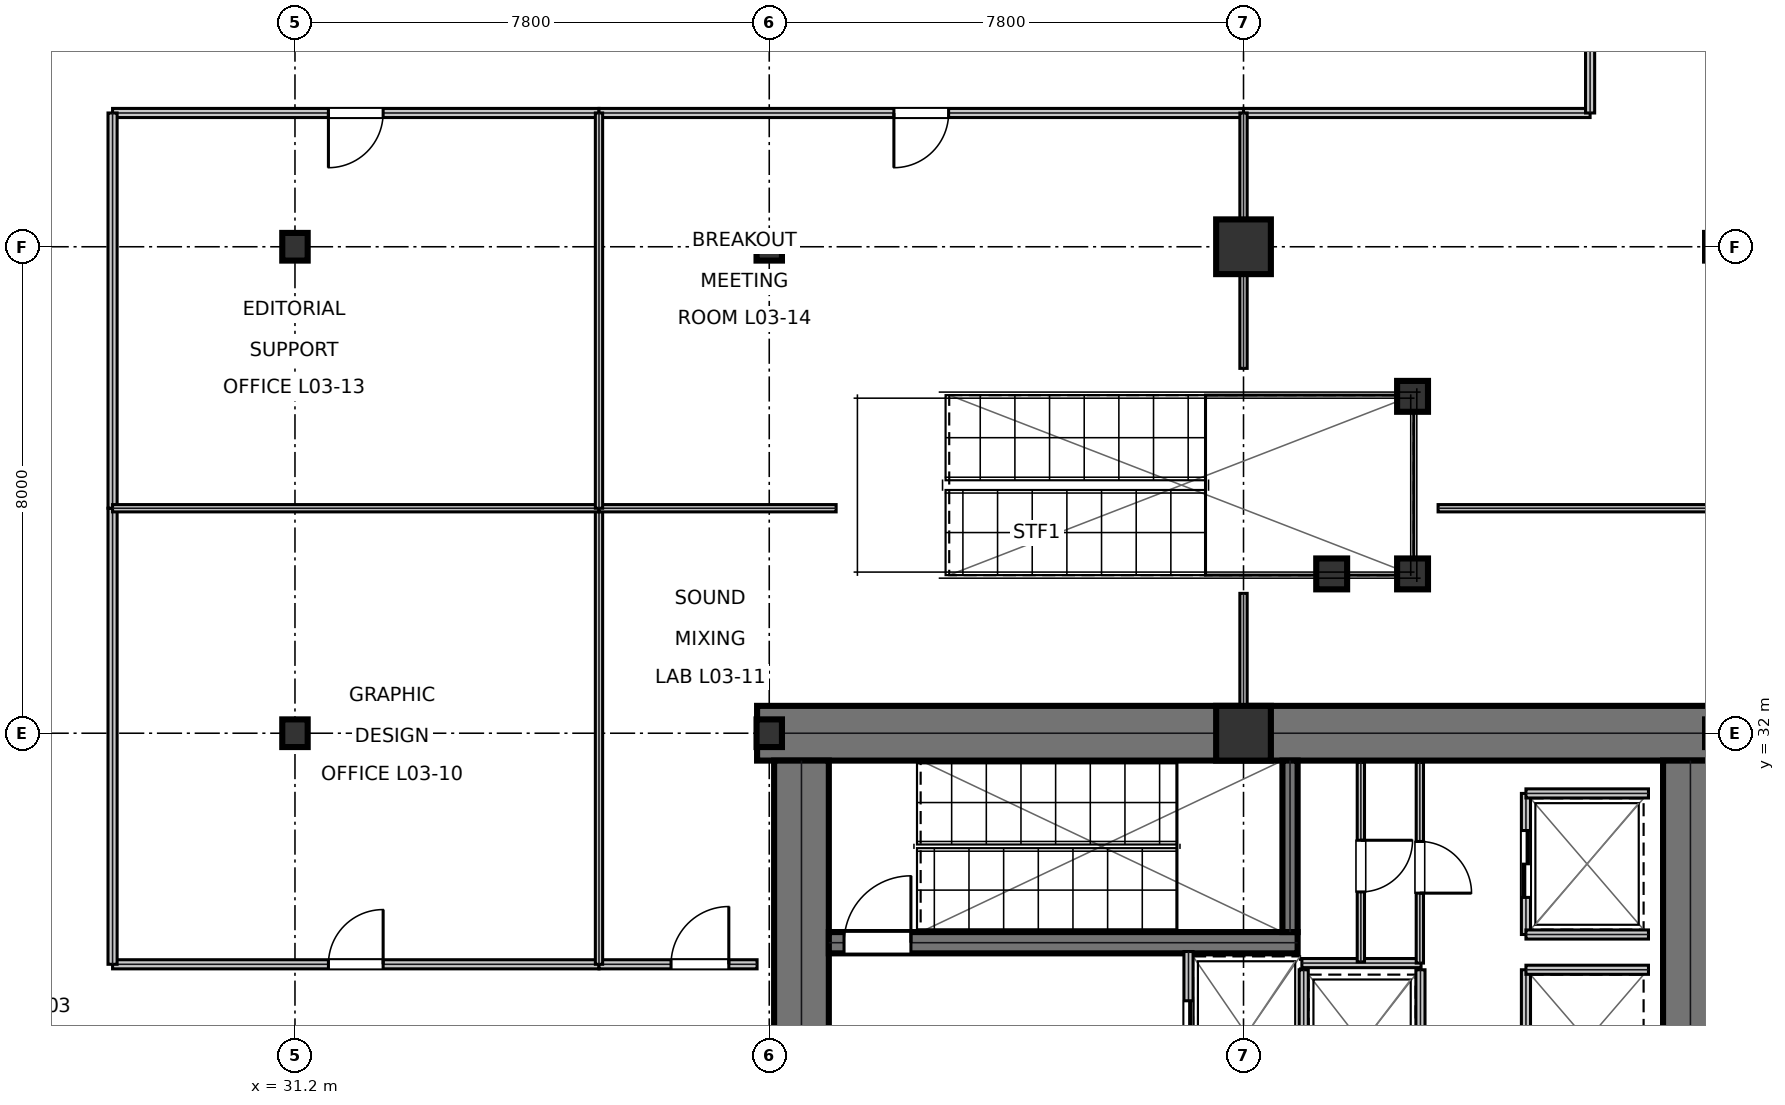
"""IFC4 building model, lengths in metres.
Left out: names, types, materials, properties, quantities, classifications, styles, units other than length and angle.
Written with IfcOpenShell. Run it as: python <this file> out.ifc"""

import sys

from ifc_helpers import new_model, si_unit, direction, frame, frame_2d, origin, origin_2d, place, context, subcontext, project, spatial, rectangle, hollow_circle, i_section, extrude, element, fill, save


model = new_model("IFC4")
c1 = context("Model", 3, precision=1e-05, world=origin(), true_north=direction((0.0, 1.0)))
c2 = subcontext(c1, "Body", "Model", "MODEL_VIEW")
j1 = project(units=[si_unit("LENGTHUNIT", "METRE"), si_unit("PLANEANGLEUNIT", "RADIAN")], contexts=[c1])
p1 = place(None, origin())
s1 = spatial("IfcSite", under=j1, at=p1, CompositionType="ELEMENT")
p2 = place(p1, origin())
s2 = spatial("IfcBuilding", under=s1, at=p2, CompositionType="ELEMENT")
p3 = place(p2, frame((0.0, 0.0, 16.2)))
s3 = spatial("IfcBuildingStorey", under=s2, at=p3, CompositionType="ELEMENT", Elevation=16.2)
p4 = place(p3, frame((38.8, 32.0, 0.0), z_axis=(0.0, 0.0, 1.0), x_axis=(1.0, 0.0, 0.0)))
e1 = element("IfcWall", 1, at=p4, inside=s3, PredefinedType="SHEAR", context=c2, shape_type="SweptSolid", body=[
    extrude(rectangle(XDim=16.0, YDim=0.9, at=frame_2d((8.0, 0.0))), origin(), (0.0, 0.0, 1.0), 5.12),
])
p5 = place(p3, frame((39.53, 25.4, 0.0), z_axis=(0.0, 0.0, 1.0), x_axis=(0.0, 1.0, 0.0)))
e2 = element("IfcWall", 2, at=p5, inside=s3, PredefinedType="SHEAR", context=c2, shape_type="SweptSolid", body=[
    extrude(rectangle(XDim=6.15, YDim=0.9, at=frame_2d((3.075, 0.0))), origin(), (0.0, 0.0, 1.0), 5.12),
])
p6 = place(p3, frame((54.15, 16.45, 0.0), z_axis=(0.0, 0.0, 1.0), x_axis=(0.0, 1.0, 0.0)))
e3 = element("IfcWall", 3, at=p6, inside=s3, PredefinedType="SHEAR", context=c2, shape_type="SweptSolid", body=[
    extrude(rectangle(XDim=15.1, YDim=0.9, at=frame_2d((7.55, 0.0))), origin(), (0.0, 0.0, 1.0), 5.12),
])
p7 = place(p3, frame((39.98, 28.555, 0.0), z_axis=(0.0, 0.0, 1.0), x_axis=(1.0, 0.0, 0.0)))
e4 = element("IfcWall", 4, at=p7, inside=s3, PredefinedType="SHEAR", context=c2, shape_type="SweptSolid", body=[
    extrude(rectangle(XDim=7.71, YDim=0.35, at=frame_2d((3.855, 0.0))), origin(), (0.0, 0.0, 1.0), 5.12),
])
p8 = place(p7, frame((0.25, 0.0, 0.0)))
e5 = element("IfcOpeningElement", 5, at=p8, cuts=e4, PredefinedType="OPENING", context=c2, shape_type="SweptSolid", body=[
    extrude(rectangle(XDim=1.1, YDim=2.15, at=frame_2d((0.55, 1.075))), frame((0.0, 0.185, 0.0), z_axis=(0.0, -1.0, 0.0), x_axis=(1.0, 0.0, 0.0)), (0.0, 0.0, 1.0), 0.37),
])
p9 = place(p3, frame((47.565, 28.73, 0.0), z_axis=(0.0, 0.0, 1.0), x_axis=(0.0, 1.0, 0.0)))
e6 = element("IfcWall", 6, at=p9, inside=s3, PredefinedType="SHEAR", context=c2, shape_type="SweptSolid", body=[
    extrude(rectangle(XDim=2.82, YDim=0.25, at=frame_2d((1.41, 0.0))), origin(), (0.0, 0.0, 1.0), 5.12),
])
for number, where, z_axis, x_axis in (
    (7, (31.2, 32.0, 0.0), (0.0, 0.0, 1.0), (1.0, 0.0, 0.0)),
    (8, (31.2, 40.0, 0.0), (0.0, 0.0, 1.0), (1.0, 0.0, 0.0)),
    (9, (39.0, 32.0, 0.0), (0.0, 0.0, 1.0), (1.0, 0.0, 0.0)),
    (10, (39.0, 40.0, 0.0), (0.0, 0.0, 1.0), (1.0, 0.0, 0.0)),
):
    element("IfcColumn", number, at=place(p3, frame(where, z_axis=z_axis, x_axis=x_axis)), inside=s3, PredefinedType="COLUMN", context=c2, shape_type="SweptSolid", body=[
        extrude(i_section(OverallWidth=0.418, OverallDepth=0.455, WebThickness=0.042, FlangeThickness=0.068, at=origin_2d()), origin(), (0.0, 0.0, 1.0), 5.395),
    ])
for number, where, z_axis, x_axis in (
    (11, (46.8, 32.0, 0.0), (0.0, 0.0, 1.0), (1.0, 0.0, 0.0)),
    (12, (46.8, 40.0, 0.0), (0.0, 0.0, 1.0), (1.0, 0.0, 0.0)),
):
    element("IfcColumn", number, at=place(p3, frame(where, z_axis=z_axis, x_axis=x_axis)), inside=s3, PredefinedType="COLUMN", context=c2, shape_type="SweptSolid", body=[
        extrude(rectangle(XDim=0.9, YDim=0.9, at=origin_2d()), origin(), (0.0, 0.0, 1.0), 5.395),
    ])
for number, where, z_axis, x_axis in (
    (13, (48.25, 34.62, 0.0), (0.0, 0.0, 1.0), (1.0, 0.0, 0.0)),
    (14, (49.58, 34.62, 0.0), (0.0, 0.0, 1.0), (1.0, 0.0, 0.0)),
    (15, (49.58, 37.54, 0.0), (0.0, 0.0, 1.0), (1.0, 0.0, 0.0)),
):
    element("IfcColumn", number, at=place(p3, frame(where, z_axis=z_axis, x_axis=x_axis)), inside=s3, PredefinedType="COLUMN", context=c2, shape_type="SweptSolid", body=[
        extrude(hollow_circle(Radius=0.254, WallThickness=0.02, at=origin_2d()), origin(), (0.0, 0.0, 1.0), 5.394),
    ])
p10 = place(p3, frame((45.895, 25.69, 0.0), z_axis=(0.0, 0.0, 1.0), x_axis=(0.0, 1.0, 0.0)))
e16 = element("IfcWall", 16, at=p10, inside=s3, PredefinedType="PARTITIONING", context=c2, shape_type="SweptSolid", body=[
    extrude(rectangle(XDim=2.72, YDim=0.15, at=frame_2d((1.36, 0.0))), origin(), (0.0, 0.0, 1.0), 5.12),
])
p11 = place(p10, frame((0.81, 0.0, 0.0)))
e17 = element("IfcOpeningElement", 17, at=p11, cuts=e16, PredefinedType="OPENING", context=c2, shape_type="SweptSolid", body=[
    extrude(rectangle(XDim=1.1, YDim=2.15, at=frame_2d((0.55, 1.075))), frame((0.0, 0.085, 0.0), z_axis=(0.0, -1.0, 0.0), x_axis=(1.0, 0.0, 0.0)), (0.0, 0.0, 1.0), 0.17),
])
for number, where, z_axis, x_axis in (
    (18, (47.79, 25.695, 0.0), (0.0, 0.0, 1.0), (0.0, 1.0, 0.0)),
    (19, (49.71, 25.695, 0.0), (0.0, 0.0, 1.0), (0.0, 1.0, 0.0)),
):
    element("IfcWall", number, at=place(p3, frame(where, z_axis=z_axis, x_axis=x_axis)), inside=s3, PredefinedType="PARTITIONING", context=c2, shape_type="SweptSolid", body=[
        extrude(rectangle(XDim=2.415, YDim=0.15, at=frame_2d((1.208, 0.0))), origin(), (0.0, 0.0, 1.0), 5.12),
    ])
p12 = place(p3, frame((51.445, 28.69, 0.0), z_axis=(0.0, 0.0, 1.0), x_axis=(0.0, 1.0, 0.0)))
e20 = element("IfcWall", 20, at=p12, inside=s3, PredefinedType="PARTITIONING", context=c2, shape_type="SweptSolid", body=[
    extrude(rectangle(XDim=2.32, YDim=0.15, at=frame_2d((1.16, 0.0))), origin(), (0.0, 0.0, 1.0), 5.12),
])
p13 = place(p12, frame((0.61, 0.0, 0.0)))
e21 = element("IfcOpeningElement", 21, at=p13, cuts=e20, PredefinedType="OPENING", context=c2, shape_type="SweptSolid", body=[
    extrude(rectangle(XDim=1.1, YDim=2.15, at=frame_2d((0.55, 1.075))), frame((0.0, 0.085, 0.0), z_axis=(0.0, -1.0, 0.0), x_axis=(1.0, 0.0, 0.0)), (0.0, 0.0, 1.0), 0.17),
])
for number, where, z_axis, x_axis in (
    (22, (51.445, 28.69, 0.0), (0.0, 0.0, 1.0), (1.0, 0.0, 0.0)),
    (23, (51.445, 31.01, 0.0), (0.0, 0.0, 1.0), (1.0, 0.0, 0.0)),
):
    element("IfcWall", number, at=place(p3, frame(where, z_axis=z_axis, x_axis=x_axis)), inside=s3, PredefinedType="PARTITIONING", context=c2, shape_type="SweptSolid", body=[
        extrude(rectangle(XDim=2.015, YDim=0.15, at=frame_2d((1.007, 0.0))), origin(), (0.0, 0.0, 1.0), 5.12),
    ])
p14 = place(p3, frame((51.445, 25.79, 0.0), z_axis=(0.0, 0.0, 1.0), x_axis=(0.0, 1.0, 0.0)))
e24 = element("IfcWall", 24, at=p14, inside=s3, PredefinedType="PARTITIONING", context=c2, shape_type="SweptSolid", body=[
    extrude(rectangle(XDim=2.32, YDim=0.15, at=frame_2d((1.16, 0.0))), origin(), (0.0, 0.0, 1.0), 5.12),
])
p15 = place(p3, frame((51.445, 28.11, 0.0), z_axis=(0.0, 0.0, 1.0), x_axis=(1.0, 0.0, 0.0)))
e25 = element("IfcWall", 25, at=p15, inside=s3, PredefinedType="PARTITIONING", context=c2, shape_type="SweptSolid", body=[
    extrude(rectangle(XDim=2.015, YDim=0.15, at=frame_2d((1.007, 0.0))), origin(), (0.0, 0.0, 1.0), 5.12),
])
p16 = place(p3, frame((47.76, 28.22, 0.0), z_axis=(0.0, 0.0, 1.0), x_axis=(1.0, 0.0, 0.0)))
e26 = element("IfcWall", 26, at=p16, inside=s3, PredefinedType="PARTITIONING", context=c2, shape_type="SweptSolid", body=[
    extrude(rectangle(XDim=1.96, YDim=0.15, at=frame_2d((0.98, 0.0))), origin(), (0.0, 0.0, 1.0), 5.12),
])
p17 = place(p3, frame((48.73, 28.24, 0.0), z_axis=(0.0, 0.0, 1.0), x_axis=(0.0, 1.0, 0.0)))
e27 = element("IfcWall", 27, at=p17, inside=s3, PredefinedType="PARTITIONING", context=c2, shape_type="SweptSolid", body=[
    extrude(rectangle(XDim=3.28, YDim=0.12, at=frame_2d((1.64, 0.0))), origin(), (0.0, 0.0, 1.0), 5.12),
])
p18 = place(p17, frame((1.15, 0.0, 0.0)))
e28 = element("IfcOpeningElement", 28, at=p18, cuts=e27, PredefinedType="OPENING", context=c2, shape_type="SweptSolid", body=[
    extrude(rectangle(XDim=0.85, YDim=2.15, at=frame_2d((0.425, 1.075))), frame((0.0, 0.07, 0.0), z_axis=(0.0, -1.0, 0.0), x_axis=(1.0, 0.0, 0.0)), (0.0, 0.0, 1.0), 0.14),
])
p19 = place(p3, frame((49.7, 28.22, 0.0), z_axis=(0.0, 0.0, 1.0), x_axis=(0.0, 1.0, 0.0)))
e29 = element("IfcWall", 29, at=p19, inside=s3, PredefinedType="PARTITIONING", context=c2, shape_type="SweptSolid", body=[
    extrude(rectangle(XDim=3.3, YDim=0.12, at=frame_2d((1.65, 0.0))), origin(), (0.0, 0.0, 1.0), 5.12),
])
p20 = place(p19, frame((1.15, 0.0, 0.0)))
e30 = element("IfcOpeningElement", 30, at=p20, cuts=e29, PredefinedType="OPENING", context=c2, shape_type="SweptSolid", body=[
    extrude(rectangle(XDim=0.85, YDim=2.15, at=frame_2d((0.425, 1.075))), frame((0.0, 0.07, 0.0), z_axis=(0.0, -1.0, 0.0), x_axis=(1.0, 0.0, 0.0)), (0.0, 0.0, 1.0), 0.14),
])
p21 = place(p3, frame((28.2, 28.2, 0.0), z_axis=(0.0, 0.0, 1.0), x_axis=(1.0, 0.0, 0.0)))
e31 = element("IfcWall", 31, at=p21, inside=s3, PredefinedType="PARTITIONING", context=c2, shape_type="SweptSolid", body=[
    extrude(rectangle(XDim=8.0, YDim=0.15, at=frame_2d((4.0, 0.0))), origin(), (0.0, 0.0, 1.0), 4.415),
])
p22 = place(p21, frame((3.55, 0.0, 0.0)))
e32 = element("IfcOpeningElement", 32, at=p22, cuts=e31, PredefinedType="OPENING", context=c2, shape_type="SweptSolid", body=[
    extrude(rectangle(XDim=0.9, YDim=2.15, at=frame_2d((0.45, 1.075))), frame((0.0, 0.085, 0.0), z_axis=(0.0, -1.0, 0.0), x_axis=(1.0, 0.0, 0.0)), (0.0, 0.0, 1.0), 0.17),
])
p23 = place(p3, frame((36.2, 28.2, 0.0), z_axis=(0.0, 0.0, 1.0), x_axis=(1.0, 0.0, 0.0)))
e33 = element("IfcWall", 33, at=p23, inside=s3, PredefinedType="PARTITIONING", context=c2, shape_type="SweptSolid", body=[
    extrude(rectangle(XDim=2.6, YDim=0.15, at=frame_2d((1.3, 0.0))), origin(), (0.0, 0.0, 1.0), 5.12),
])
p24 = place(p23, frame((1.185, 0.0, 0.0)))
e34 = element("IfcOpeningElement", 34, at=p24, cuts=e33, PredefinedType="OPENING", context=c2, shape_type="SweptSolid", body=[
    extrude(rectangle(XDim=0.95, YDim=2.15, at=frame_2d((0.475, 1.075))), frame((0.0, 0.085, 0.0), z_axis=(0.0, -1.0, 0.0), x_axis=(1.0, 0.0, 0.0)), (0.0, 0.0, 1.0), 0.17),
])
p25 = place(p3, frame((28.2, 42.2, 0.0), z_axis=(0.0, 0.0, 1.0), x_axis=(1.0, 0.0, 0.0)))
e35 = element("IfcWall", 35, at=p25, inside=s3, PredefinedType="PARTITIONING", context=c2, shape_type="SweptSolid", body=[
    extrude(rectangle(XDim=8.0, YDim=0.15, at=frame_2d((4.0, 0.0))), origin(), (0.0, 0.0, 1.0), 4.415),
])
p26 = place(p25, frame((3.55, 0.0, 0.0)))
e36 = element("IfcOpeningElement", 36, at=p26, cuts=e35, PredefinedType="OPENING", context=c2, shape_type="SweptSolid", body=[
    extrude(rectangle(XDim=0.9, YDim=2.15, at=frame_2d((0.45, 1.075))), frame((0.0, 0.085, 0.0), z_axis=(0.0, -1.0, 0.0), x_axis=(1.0, 0.0, 0.0)), (0.0, 0.0, 1.0), 0.17),
])
p27 = place(p3, frame((36.2, 42.2, 0.0), z_axis=(0.0, 0.0, 1.0), x_axis=(1.0, 0.0, 0.0)))
e37 = element("IfcWall", 37, at=p27, inside=s3, PredefinedType="PARTITIONING", context=c2, shape_type="SweptSolid", body=[
    extrude(rectangle(XDim=10.6, YDim=0.15, at=frame_2d((5.3, 0.0))), origin(), (0.0, 0.0, 1.0), 4.415),
])
p28 = place(p27, frame((4.85, 0.0, 0.0)))
e38 = element("IfcOpeningElement", 38, at=p28, cuts=e37, PredefinedType="OPENING", context=c2, shape_type="SweptSolid", body=[
    extrude(rectangle(XDim=0.9, YDim=2.15, at=frame_2d((0.45, 1.075))), frame((0.0, 0.085, 0.0), z_axis=(0.0, -1.0, 0.0), x_axis=(1.0, 0.0, 0.0)), (0.0, 0.0, 1.0), 0.17),
])
p29 = place(p3, frame((28.2, 28.2, 0.0), z_axis=(0.0, 0.0, 1.0), x_axis=(0.0, 1.0, 0.0)))
e39 = element("IfcWall", 39, at=p29, inside=s3, PredefinedType="PARTITIONING", context=c2, shape_type="SweptSolid", body=[
    extrude(rectangle(XDim=7.5, YDim=0.15, at=frame_2d((3.75, 0.0))), origin(), (0.0, 0.0, 1.0), 4.338),
])
p30 = place(p3, frame((28.2, 35.7, 0.0), z_axis=(0.0, 0.0, 1.0), x_axis=(0.0, 1.0, 0.0)))
e40 = element("IfcWall", 40, at=p30, inside=s3, PredefinedType="PARTITIONING", context=c2, shape_type="SweptSolid", body=[
    extrude(rectangle(XDim=6.5, YDim=0.15, at=frame_2d((3.25, 0.0))), origin(), (0.0, 0.0, 1.0), 4.338),
])
p31 = place(p3, frame((46.8, 42.2, 0.0), z_axis=(0.0, 0.0, 1.0), x_axis=(1.0, 0.0, 0.0)))
e41 = element("IfcWall", 41, at=p31, inside=s3, PredefinedType="PARTITIONING", context=c2, shape_type="SweptSolid", body=[
    extrude(rectangle(XDim=5.7, YDim=0.15, at=frame_2d((2.85, 0.0))), origin(), (0.0, 0.0, 1.0), 4.415),
])
p32 = place(p3, frame((52.5, 42.2, 0.0), z_axis=(0.0, 0.0, 1.0), x_axis=(0.0, 1.0, 0.0)))
e42 = element("IfcWall", 42, at=p32, inside=s3, PredefinedType="PARTITIONING", context=c2, shape_type="SweptSolid", body=[
    extrude(rectangle(XDim=2.0, YDim=0.15, at=frame_2d((1.0, 0.0))), origin(), (0.0, 0.0, 1.0), 4.701),
])
p33 = place(p3, frame((46.8, 32.4, 0.0), z_axis=(0.0, 0.0, 1.0), x_axis=(0.0, 1.0, 0.0)))
e43 = element("IfcWall", 43, at=p33, inside=s3, PredefinedType="PARTITIONING", context=c2, shape_type="SweptSolid", body=[
    extrude(rectangle(XDim=1.9, YDim=0.12, at=frame_2d((0.95, 0.0))), origin(), (0.0, 0.0, 1.0), 5.12),
])
p34 = place(p3, frame((50.0, 35.7, 0.0), z_axis=(0.0, 0.0, 1.0), x_axis=(1.0, 0.0, 0.0)))
e44 = element("IfcWall", 44, at=p34, inside=s3, PredefinedType="PARTITIONING", context=c2, shape_type="SweptSolid", body=[
    extrude(rectangle(XDim=12.4, YDim=0.12, at=frame_2d((6.2, 0.0))), origin(), (0.0, 0.0, 1.0), 4.415),
])
p35 = place(p3, frame((36.2, 28.2, 0.0), z_axis=(0.0, 0.0, 1.0), x_axis=(0.0, 1.0, 0.0)))
e45 = element("IfcWall", 45, at=p35, inside=s3, PredefinedType="PARTITIONING", context=c2, shape_type="SweptSolid", body=[
    extrude(rectangle(XDim=7.5, YDim=0.12, at=frame_2d((3.75, 0.0))), origin(), (0.0, 0.0, 1.0), 4.338),
])
p36 = place(p3, frame((28.2, 35.7, 0.0), z_axis=(0.0, 0.0, 1.0), x_axis=(1.0, 0.0, 0.0)))
e46 = element("IfcWall", 46, at=p36, inside=s3, PredefinedType="PARTITIONING", context=c2, shape_type="SweptSolid", body=[
    extrude(rectangle(XDim=8.0, YDim=0.12, at=frame_2d((4.0, 0.0))), origin(), (0.0, 0.0, 1.0), 4.415),
])
p37 = place(p3, frame((36.2, 35.7, 0.0), z_axis=(0.0, 0.0, 1.0), x_axis=(1.0, 0.0, 0.0)))
e47 = element("IfcWall", 47, at=p37, inside=s3, PredefinedType="PARTITIONING", context=c2, shape_type="SweptSolid", body=[
    extrude(rectangle(XDim=3.9, YDim=0.12, at=frame_2d((1.95, 0.0))), origin(), (0.0, 0.0, 1.0), 4.415),
])
p38 = place(p3, frame((36.2, 35.7, 0.0), z_axis=(0.0, 0.0, 1.0), x_axis=(0.0, 1.0, 0.0)))
e48 = element("IfcWall", 48, at=p38, inside=s3, PredefinedType="PARTITIONING", context=c2, shape_type="SweptSolid", body=[
    extrude(rectangle(XDim=6.5, YDim=0.12, at=frame_2d((3.25, 0.0))), origin(), (0.0, 0.0, 1.0), 4.338),
])
p39 = place(p3, frame((46.8, 38.0, 0.0), z_axis=(0.0, 0.0, 1.0), x_axis=(0.0, 1.0, 0.0)))
e49 = element("IfcWall", 49, at=p39, inside=s3, PredefinedType="PARTITIONING", context=c2, shape_type="SweptSolid", body=[
    extrude(rectangle(XDim=4.2, YDim=0.12, at=frame_2d((2.1, 0.0))), origin(), (0.0, 0.0, 1.0), 4.338),
])
p40 = place(p11, frame((1.1, 0.0, 0.0), z_axis=(0.0, 0.0, 1.0), x_axis=(-1.0, 0.0, 0.0)))
e50 = element("IfcDoor", 50, at=p40, inside=s3, OperationType="DOUBLE_DOOR_SLIDING", PredefinedType="DOOR", context=c2, shape_type="SweptSolid", body=[
    extrude(rectangle(XDim=1.1, YDim=2.15, at=frame_2d((0.55, 1.075))), frame((0.0, 0.025, 0.0), z_axis=(0.0, -1.0, 0.0), x_axis=(1.0, 0.0, 0.0)), (0.0, 0.0, 1.0), 0.05),
])
fill(e17, e50)
p41 = place(p13, frame((1.1, 0.0, 0.0), z_axis=(0.0, 0.0, 1.0), x_axis=(-1.0, 0.0, 0.0)))
e51 = element("IfcDoor", 51, at=p41, inside=s3, OperationType="DOUBLE_DOOR_SLIDING", PredefinedType="DOOR", context=c2, shape_type="SweptSolid", body=[
    extrude(rectangle(XDim=1.1, YDim=2.15, at=frame_2d((0.55, 1.075))), frame((0.0, 0.025, 0.0), z_axis=(0.0, -1.0, 0.0), x_axis=(1.0, 0.0, 0.0)), (0.0, 0.0, 1.0), 0.05),
])
fill(e21, e51)
p42 = place(p18, frame((0.85, 0.0, 0.0), z_axis=(0.0, 0.0, 1.0), x_axis=(-1.0, 0.0, 0.0)))
e52 = element("IfcDoor", 52, at=p42, inside=s3, OperationType="SINGLE_SWING_LEFT", PredefinedType="DOOR", context=c2, shape_type="SweptSolid", body=[
    extrude(rectangle(XDim=0.85, YDim=2.15, at=frame_2d((0.425, 1.075))), frame((0.0, 0.025, 0.0), z_axis=(0.0, -1.0, 0.0), x_axis=(1.0, 0.0, 0.0)), (0.0, 0.0, 1.0), 0.05),
])
fill(e28, e52)
p43 = place(p20, frame((0.85, 0.0, 0.0), z_axis=(0.0, 0.0, 1.0), x_axis=(-1.0, 0.0, 0.0)))
e53 = element("IfcDoor", 53, at=p43, inside=s3, OperationType="SINGLE_SWING_RIGHT", PredefinedType="DOOR", context=c2, shape_type="SweptSolid", body=[
    extrude(rectangle(XDim=0.85, YDim=2.15, at=frame_2d((0.425, 1.075))), frame((0.0, 0.025, 0.0), z_axis=(0.0, -1.0, 0.0), x_axis=(1.0, 0.0, 0.0)), (0.0, 0.0, 1.0), 0.05),
])
fill(e30, e53)
p44 = place(p22, origin())
e54 = element("IfcDoor", 54, at=p44, inside=s3, OperationType="SINGLE_SWING_RIGHT", PredefinedType="DOOR", context=c2, shape_type="SweptSolid", body=[
    extrude(rectangle(XDim=0.9, YDim=2.15, at=frame_2d((0.45, 1.075))), frame((0.0, 0.025, 0.0), z_axis=(0.0, -1.0, 0.0), x_axis=(1.0, 0.0, 0.0)), (0.0, 0.0, 1.0), 0.05),
])
fill(e32, e54)
p45 = place(p24, origin())
e55 = element("IfcDoor", 55, at=p45, inside=s3, OperationType="SINGLE_SWING_RIGHT", PredefinedType="DOOR", context=c2, shape_type="SweptSolid", body=[
    extrude(rectangle(XDim=0.95, YDim=2.15, at=frame_2d((0.475, 1.075))), frame((0.0, 0.025, 0.0), z_axis=(0.0, -1.0, 0.0), x_axis=(1.0, 0.0, 0.0)), (0.0, 0.0, 1.0), 0.05),
])
fill(e34, e55)
p46 = place(p26, frame((0.9, 0.0, 0.0), z_axis=(0.0, 0.0, 1.0), x_axis=(-1.0, 0.0, 0.0)))
e56 = element("IfcDoor", 56, at=p46, inside=s3, OperationType="SINGLE_SWING_RIGHT", PredefinedType="DOOR", context=c2, shape_type="SweptSolid", body=[
    extrude(rectangle(XDim=0.9, YDim=2.15, at=frame_2d((0.45, 1.075))), frame((0.0, 0.025, 0.0), z_axis=(0.0, -1.0, 0.0), x_axis=(1.0, 0.0, 0.0)), (0.0, 0.0, 1.0), 0.05),
])
fill(e36, e56)
p47 = place(p28, frame((0.9, 0.0, 0.0), z_axis=(0.0, 0.0, 1.0), x_axis=(-1.0, 0.0, 0.0)))
e57 = element("IfcDoor", 57, at=p47, inside=s3, OperationType="SINGLE_SWING_RIGHT", PredefinedType="DOOR", context=c2, shape_type="SweptSolid", body=[
    extrude(rectangle(XDim=0.9, YDim=2.15, at=frame_2d((0.45, 1.075))), frame((0.0, 0.025, 0.0), z_axis=(0.0, -1.0, 0.0), x_axis=(1.0, 0.0, 0.0)), (0.0, 0.0, 1.0), 0.05),
])
fill(e38, e57)
p48 = place(p8, origin())
e58 = element("IfcDoor", 58, at=p48, inside=s3, OperationType="SINGLE_SWING_RIGHT", PredefinedType="DOOR", context=c2, shape_type="SweptSolid", body=[
    extrude(rectangle(XDim=1.1, YDim=2.15, at=frame_2d((0.55, 1.075))), frame((0.0, 0.025, 0.0), z_axis=(0.0, -1.0, 0.0), x_axis=(1.0, 0.0, 0.0)), (0.0, 0.0, 1.0), 0.05),
])
fill(e5, e58)
save(model, sys.argv[1])
